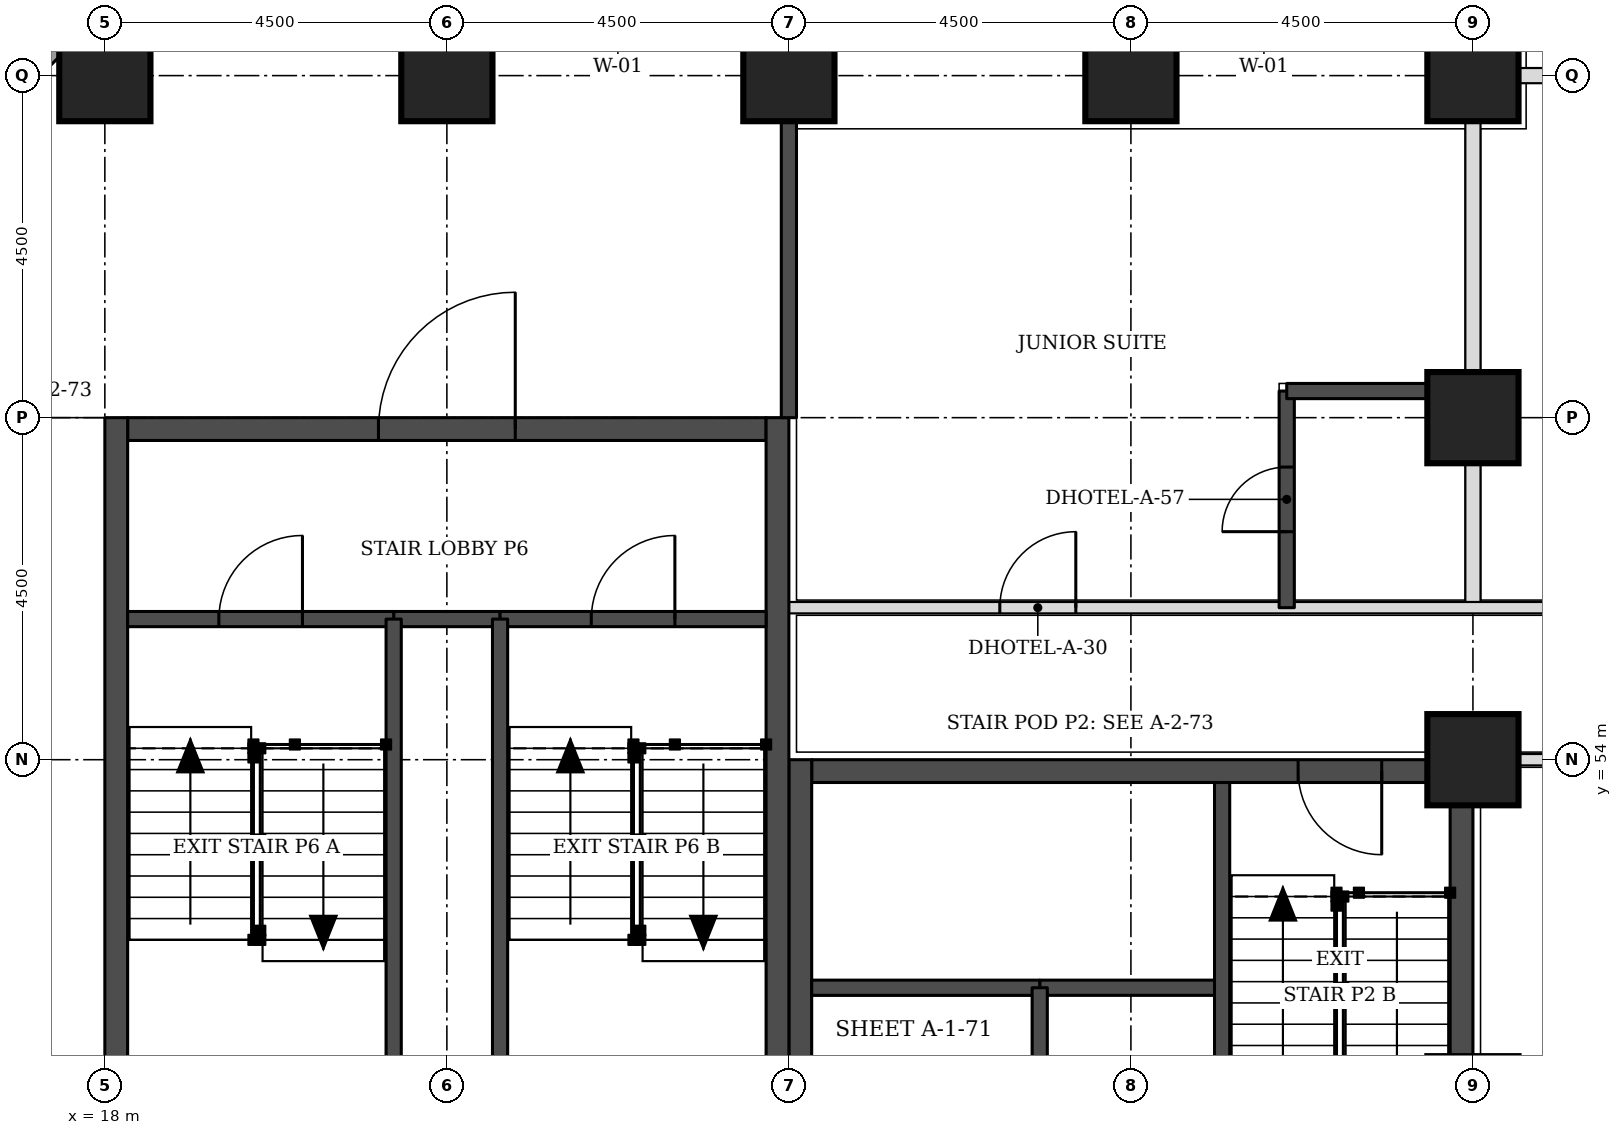
"""IFC4 building model, lengths in metres.
Left out: names, types, materials, properties, quantities, classifications, styles, units other than length and angle.
Written with IfcOpenShell. Run it as: python <this file> out.ifc"""

import sys

from ifc_helpers import new_model, si_unit, direction, frame, frame_2d, origin, origin_2d, place, context, subcontext, project, spatial, rectangle, extrude, element, fill, save


model = new_model("IFC4")
c1 = context("Model", 3, precision=1e-05, world=origin(), true_north=direction((0.0, 1.0)))
c2 = subcontext(c1, "Body", "Model", "MODEL_VIEW")
j1 = project(units=[si_unit("LENGTHUNIT", "METRE"), si_unit("PLANEANGLEUNIT", "RADIAN")], contexts=[c1])
p1 = place(None, origin())
s1 = spatial("IfcSite", under=j1, at=p1, CompositionType="ELEMENT")
p2 = place(p1, origin())
s2 = spatial("IfcBuilding", under=s1, at=p2, CompositionType="ELEMENT")
p3 = place(p2, frame((0.0, 0.0, 26.4)))
s3 = spatial("IfcBuildingStorey", under=s2, at=p3, CompositionType="ELEMENT", Elevation=26.4)
for number, where, z_axis, x_axis in (
    (1, (36.0, 54.0, 0.0), (0.0, 0.0, 1.0), (1.0, 0.0, 0.0)),
    (2, (36.0, 58.5, 0.0), (0.0, 0.0, 1.0), (1.0, 0.0, 0.0)),
    (3, (18.0, 63.0, 0.0), (0.0, 0.0, 1.0), (1.0, 0.0, 0.0)),
    (4, (22.5, 63.0, 0.0), (0.0, 0.0, 1.0), (1.0, 0.0, 0.0)),
    (5, (27.0, 63.0, 0.0), (0.0, 0.0, 1.0), (1.0, 0.0, 0.0)),
    (6, (31.5, 63.0, 0.0), (0.0, 0.0, 1.0), (1.0, 0.0, 0.0)),
    (7, (36.0, 63.0, 0.0), (0.0, 0.0, 1.0), (1.0, 0.0, 0.0)),
):
    element("IfcColumn", number, at=place(p3, frame(where, z_axis=z_axis, x_axis=x_axis)), inside=s3, PredefinedType="COLUMN", context=c2, shape_type="SweptSolid", body=[
        extrude(rectangle(XDim=1.2, YDim=1.2, at=origin_2d()), origin(), (0.0, 0.0, 1.0), 3.3),
    ])
p4 = place(p3, frame((27.3, 53.85, 0.0), z_axis=(0.0, 0.0, 1.0), x_axis=(1.0, 0.0, 0.0)))
e8 = element("IfcWall", 8, at=p4, inside=s3, PredefinedType="SHEAR", context=c2, shape_type="SweptSolid", body=[
    extrude(rectangle(XDim=8.4, YDim=0.3, at=frame_2d((4.2, 0.0))), origin(), (0.0, 0.0, 1.0), 3.3),
])
p5 = place(p4, frame((6.4, 0.0, 0.0)))
e9 = element("IfcOpeningElement", 9, at=p5, cuts=e8, PredefinedType="OPENING", context=c2, shape_type="SweptSolid", body=[
    extrude(rectangle(XDim=1.1, YDim=2.1, at=frame_2d((0.55, 1.05))), frame((0.0, 0.16, 0.0), z_axis=(0.0, -1.0, 0.0), x_axis=(1.0, 0.0, 0.0)), (0.0, 0.0, 1.0), 0.32),
])
p6 = place(p3, frame((27.15, 45.0, 0.0), z_axis=(0.0, 0.0, 1.0), x_axis=(0.0, 1.0, 0.0)))
e10 = element("IfcWall", 10, at=p6, inside=s3, PredefinedType="SHEAR", context=c2, shape_type="SweptSolid", body=[
    extrude(rectangle(XDim=9.0, YDim=0.3, at=frame_2d((4.5, 0.0))), origin(), (0.0, 0.0, 1.0), 3.3),
])
p7 = place(p6, frame((0.4, 0.0, 0.0)))
e11 = element("IfcOpeningElement", 11, at=p7, cuts=e10, PredefinedType="OPENING", context=c2, shape_type="SweptSolid", body=[
    extrude(rectangle(XDim=1.1, YDim=2.1, at=frame_2d((0.55, 1.05))), frame((0.0, 0.16, 0.0), z_axis=(0.0, -1.0, 0.0), x_axis=(1.0, 0.0, 0.0)), (0.0, 0.0, 1.0), 0.32),
])
p8 = place(p3, frame((35.85, 45.0, 0.0), z_axis=(0.0, 0.0, 1.0), x_axis=(0.0, 1.0, 0.0)))
e12 = element("IfcWall", 12, at=p8, inside=s3, PredefinedType="SHEAR", context=c2, shape_type="SweptSolid", body=[
    extrude(rectangle(XDim=9.0, YDim=0.3, at=frame_2d((4.5, 0.0))), origin(), (0.0, 0.0, 1.0), 3.3),
])
p9 = place(p3, frame((18.3, 58.35, 0.0), z_axis=(0.0, 0.0, 1.0), x_axis=(1.0, 0.0, 0.0)))
e13 = element("IfcWall", 13, at=p9, inside=s3, PredefinedType="SHEAR", context=c2, shape_type="SweptSolid", body=[
    extrude(rectangle(XDim=8.4, YDim=0.3, at=frame_2d((4.2, 0.0))), origin(), (0.0, 0.0, 1.0), 3.3),
])
p10 = place(p9, frame((3.3, 0.0, 0.0)))
e14 = element("IfcOpeningElement", 14, at=p10, cuts=e13, PredefinedType="OPENING", context=c2, shape_type="SweptSolid", body=[
    extrude(rectangle(XDim=1.8, YDim=2.1, at=frame_2d((0.9, 1.05))), frame((0.0, 0.16, 0.0), z_axis=(0.0, -1.0, 0.0), x_axis=(1.0, 0.0, 0.0)), (0.0, 0.0, 1.0), 0.32),
])
for number, where, z_axis, x_axis in (
    (15, (18.15, 49.5, 0.0), (0.0, 0.0, 1.0), (0.0, 1.0, 0.0)),
    (16, (26.85, 49.5, 0.0), (0.0, 0.0, 1.0), (0.0, 1.0, 0.0)),
):
    element("IfcWall", number, at=place(p3, frame(where, z_axis=z_axis, x_axis=x_axis)), inside=s3, PredefinedType="SHEAR", context=c2, shape_type="SweptSolid", body=[
        extrude(rectangle(XDim=9.0, YDim=0.3, at=frame_2d((4.5, 0.0))), origin(), (0.0, 0.0, 1.0), 3.3),
    ])
p11 = place(p3, frame((17.73, 63.826, 0.0), z_axis=(0.0, 0.0, 1.0), x_axis=(-0.707106781187, -0.707106781187, 0.0)))
e17 = element("IfcWall", 17, at=p11, inside=s3, PredefinedType="STANDARD", context=c2, shape_type="SweptSolid", body=[
    extrude(rectangle(XDim=7.151, YDim=0.35, at=frame_2d((3.576, 0.0))), origin(), (0.0, 0.0, 1.0), 3.055),
])
p12 = place(p11, frame((1.926, 0.0, 0.8)))
e18 = element("IfcOpeningElement", 18, at=p12, cuts=e17, PredefinedType="OPENING", context=c2, shape_type="SweptSolid", body=[
    extrude(rectangle(XDim=3.3, YDim=1.5, at=frame_2d((1.65, 0.75))), frame((0.0, 0.185, 0.0), z_axis=(0.0, -1.0, 0.0), x_axis=(1.0, 0.0, 0.0)), (0.0, 0.0, 1.0), 0.37),
])
p13 = place(p3, frame((36.0, 56.0, 0.0), z_axis=(0.0, 0.0, 1.0), x_axis=(0.0, 1.0, 0.0)))
e19 = element("IfcWall", 19, at=p13, inside=s3, PredefinedType="PARTITIONING", context=c2, shape_type="SweptSolid", body=[
    extrude(rectangle(XDim=6.4, YDim=0.2, at=frame_2d((3.2, 0.0))), origin(), (0.0, 0.0, 1.0), 2.33),
])
p14 = place(p3, frame((36.6, 63.0, 0.0), z_axis=(0.0, 0.0, 1.0), x_axis=(1.0, 0.0, 0.0)))
e20 = element("IfcWall", 20, at=p14, inside=s3, PredefinedType="PARTITIONING", context=c2, shape_type="SweptSolid", body=[
    extrude(rectangle(XDim=6.4, YDim=0.2, at=frame_2d((3.2, 0.0))), origin(), (0.0, 0.0, 1.0), 3.08),
])
p15 = place(p3, frame((36.05, 54.0, 0.0), z_axis=(0.0, 0.0, 1.0), x_axis=(1.0, 0.0, 0.0)))
e21 = element("IfcWall", 21, at=p15, inside=s3, PredefinedType="PARTITIONING", context=c2, shape_type="SweptSolid", body=[
    extrude(rectangle(XDim=6.95, YDim=0.15, at=frame_2d((3.475, 0.0))), origin(), (0.0, 0.0, 1.0), 3.08),
])
p16 = place(p15, frame((3.0, 0.0, 0.0)))
e22 = element("IfcOpeningElement", 22, at=p16, cuts=e21, PredefinedType="OPENING", context=c2, shape_type="SweptSolid", body=[
    extrude(rectangle(XDim=0.9, YDim=2.1, at=frame_2d((0.45, 1.05))), frame((0.0, 0.085, 0.0), z_axis=(0.0, -1.0, 0.0), x_axis=(1.0, 0.0, 0.0)), (0.0, 0.0, 1.0), 0.17),
])
p17 = place(p3, frame((27.0, 56.0, 0.0), z_axis=(0.0, 0.0, 1.0), x_axis=(1.0, 0.0, 0.0)))
e23 = element("IfcWall", 23, at=p17, inside=s3, PredefinedType="PARTITIONING", context=c2, shape_type="SweptSolid", body=[
    extrude(rectangle(XDim=16.0, YDim=0.15, at=frame_2d((8.0, 0.0))), origin(), (0.0, 0.0, 1.0), 3.08),
])
p18 = place(p17, frame((2.775, 0.0, 0.0)))
e24 = element("IfcOpeningElement", 24, at=p18, cuts=e23, PredefinedType="OPENING", context=c2, shape_type="SweptSolid", body=[
    extrude(rectangle(XDim=1.0, YDim=2.1, at=frame_2d((0.5, 1.05))), frame((0.0, 0.085, 0.0), z_axis=(0.0, -1.0, 0.0), x_axis=(1.0, 0.0, 0.0)), (0.0, 0.0, 1.0), 0.17),
])
p19 = place(p3, frame((27.0, 58.5, 0.0), z_axis=(0.0, 0.0, 1.0), x_axis=(0.0, 1.0, 0.0)))
e25 = element("IfcWall", 25, at=p19, inside=s3, PredefinedType="SOLIDWALL", context=c2, shape_type="SweptSolid", body=[
    extrude(rectangle(XDim=3.9, YDim=0.2, at=frame_2d((1.95, 0.0))), origin(), (0.0, 0.0, 1.0), 3.08),
])
p20 = place(p3, frame((33.55, 56.0, 0.0), z_axis=(0.0, 0.0, 1.0), x_axis=(0.0, 1.0, 0.0)))
e26 = element("IfcWall", 26, at=p20, inside=s3, PredefinedType="SOLIDWALL", context=c2, shape_type="SweptSolid", body=[
    extrude(rectangle(XDim=2.85, YDim=0.2, at=frame_2d((1.425, 0.0))), origin(), (0.0, 0.0, 1.0), 3.08),
])
p21 = place(p20, frame((1.0, 0.0, 0.0)))
e27 = element("IfcOpeningElement", 27, at=p21, cuts=e26, PredefinedType="OPENING", context=c2, shape_type="SweptSolid", body=[
    extrude(rectangle(XDim=0.85, YDim=2.1, at=frame_2d((0.425, 1.05))), frame((0.0, 0.11, 0.0), z_axis=(0.0, -1.0, 0.0), x_axis=(1.0, 0.0, 0.0)), (0.0, 0.0, 1.0), 0.22),
])
p22 = place(p3, frame((33.55, 58.85, 0.0), z_axis=(0.0, 0.0, 1.0), x_axis=(1.0, 0.0, 0.0)))
e28 = element("IfcWall", 28, at=p22, inside=s3, PredefinedType="SOLIDWALL", context=c2, shape_type="SweptSolid", body=[
    extrude(rectangle(XDim=2.45, YDim=0.2, at=frame_2d((1.225, 0.0))), origin(), (0.0, 0.0, 1.0), 3.08),
])
p23 = place(p3, frame((30.3, 51.0, 0.0), z_axis=(0.0, 0.0, 1.0), x_axis=(1.0, 0.0, 0.0)))
e29 = element("IfcWall", 29, at=p23, inside=s3, PredefinedType="SOLIDWALL", context=c2, shape_type="SweptSolid", body=[
    extrude(rectangle(XDim=2.4, YDim=0.2, at=frame_2d((1.2, 0.0))), origin(), (0.0, 0.0, 1.0), 3.3),
])
p24 = place(p3, frame((27.3, 51.0, 0.0), z_axis=(0.0, 0.0, 1.0), x_axis=(1.0, 0.0, 0.0)))
e30 = element("IfcWall", 30, at=p24, inside=s3, PredefinedType="SOLIDWALL", context=c2, shape_type="SweptSolid", body=[
    extrude(rectangle(XDim=3.0, YDim=0.2, at=frame_2d((1.5, 0.0))), origin(), (0.0, 0.0, 1.0), 3.08),
])
for number, where, z_axis, x_axis in (
    (31, (30.3, 45.3, 0.0), (0.0, 0.0, 1.0), (0.0, 1.0, 0.0)),
    (32, (32.7, 48.0, 0.0), (0.0, 0.0, 1.0), (0.0, 1.0, 0.0)),
):
    element("IfcWall", number, at=place(p3, frame(where, z_axis=z_axis, x_axis=x_axis)), inside=s3, PredefinedType="SOLIDWALL", context=c2, shape_type="SweptSolid", body=[
        extrude(rectangle(XDim=5.7, YDim=0.2, at=frame_2d((2.85, 0.0))), origin(), (0.0, 0.0, 1.0), 3.08),
    ])
p25 = place(p3, frame((21.8, 55.85, 0.0), z_axis=(0.0, 0.0, 1.0), x_axis=(1.0, 0.0, 0.0)))
e33 = element("IfcWall", 33, at=p25, inside=s3, PredefinedType="SOLIDWALL", context=c2, shape_type="SweptSolid", body=[
    extrude(rectangle(XDim=1.4, YDim=0.2, at=frame_2d((0.7, 0.0))), origin(), (0.0, 0.0, 1.0), 3.08),
])
p26 = place(p3, frame((18.3, 55.85, 0.0), z_axis=(0.0, 0.0, 1.0), x_axis=(1.0, 0.0, 0.0)))
e34 = element("IfcWall", 34, at=p26, inside=s3, PredefinedType="SOLIDWALL", context=c2, shape_type="SweptSolid", body=[
    extrude(rectangle(XDim=3.5, YDim=0.2, at=frame_2d((1.75, 0.0))), origin(), (0.0, 0.0, 1.0), 3.08),
])
p27 = place(p26, frame((1.2, 0.0, 0.0)))
e35 = element("IfcOpeningElement", 35, at=p27, cuts=e34, PredefinedType="OPENING", context=c2, shape_type="SweptSolid", body=[
    extrude(rectangle(XDim=1.1, YDim=2.1, at=frame_2d((0.55, 1.05))), frame((0.0, 0.11, 0.0), z_axis=(0.0, -1.0, 0.0), x_axis=(1.0, 0.0, 0.0)), (0.0, 0.0, 1.0), 0.22),
])
p28 = place(p3, frame((23.2, 55.85, 0.0), z_axis=(0.0, 0.0, 1.0), x_axis=(1.0, 0.0, 0.0)))
e36 = element("IfcWall", 36, at=p28, inside=s3, PredefinedType="SOLIDWALL", context=c2, shape_type="SweptSolid", body=[
    extrude(rectangle(XDim=3.5, YDim=0.2, at=frame_2d((1.75, 0.0))), origin(), (0.0, 0.0, 1.0), 3.08),
])
p29 = place(p28, frame((1.2, 0.0, 0.0)))
e37 = element("IfcOpeningElement", 37, at=p29, cuts=e36, PredefinedType="OPENING", context=c2, shape_type="SweptSolid", body=[
    extrude(rectangle(XDim=1.1, YDim=2.1, at=frame_2d((0.55, 1.05))), frame((0.0, 0.11, 0.0), z_axis=(0.0, -1.0, 0.0), x_axis=(1.0, 0.0, 0.0)), (0.0, 0.0, 1.0), 0.22),
])
for number, where, z_axis, x_axis in (
    (38, (21.8, 49.8, 0.0), (0.0, 0.0, 1.0), (0.0, 1.0, 0.0)),
    (39, (23.2, 49.8, 0.0), (0.0, 0.0, 1.0), (0.0, 1.0, 0.0)),
):
    element("IfcWall", number, at=place(p3, frame(where, z_axis=z_axis, x_axis=x_axis)), inside=s3, PredefinedType="SOLIDWALL", context=c2, shape_type="SweptSolid", body=[
        extrude(rectangle(XDim=6.05, YDim=0.2, at=frame_2d((3.025, 0.0))), origin(), (0.0, 0.0, 1.0), 3.08),
    ])
p30 = place(p18, origin())
e40 = element("IfcDoor", 40, at=p30, inside=s3, OperationType="SINGLE_SWING_RIGHT", PredefinedType="DOOR", context=c2, shape_type="SweptSolid", body=[
    extrude(rectangle(XDim=1.0, YDim=2.1, at=frame_2d((0.5, 1.05))), frame((0.0, 0.025, 0.0), z_axis=(0.0, -1.0, 0.0), x_axis=(1.0, 0.0, 0.0)), (0.0, 0.0, 1.0), 0.05),
])
fill(e24, e40)
p31 = place(p21, origin())
e41 = element("IfcDoor", 41, at=p31, inside=s3, OperationType="SINGLE_SWING_LEFT", PredefinedType="DOOR", context=c2, shape_type="SweptSolid", body=[
    extrude(rectangle(XDim=0.85, YDim=2.1, at=frame_2d((0.425, 1.05))), frame((0.0, 0.025, 0.0), z_axis=(0.0, -1.0, 0.0), x_axis=(1.0, 0.0, 0.0)), (0.0, 0.0, 1.0), 0.05),
])
fill(e27, e41)
p32 = place(p5, frame((1.1, 0.0, 0.0), z_axis=(0.0, 0.0, 1.0), x_axis=(-1.0, 0.0, 0.0)))
e42 = element("IfcDoor", 42, at=p32, inside=s3, OperationType="SINGLE_SWING_LEFT", PredefinedType="DOOR", context=c2, shape_type="SweptSolid", body=[
    extrude(rectangle(XDim=1.1, YDim=2.1, at=frame_2d((0.55, 1.05))), frame((0.0, 0.025, 0.0), z_axis=(0.0, -1.0, 0.0), x_axis=(1.0, 0.0, 0.0)), (0.0, 0.0, 1.0), 0.05),
])
fill(e9, e42)
p33 = place(p27, origin())
e43 = element("IfcDoor", 43, at=p33, inside=s3, OperationType="SINGLE_SWING_RIGHT", PredefinedType="DOOR", context=c2, shape_type="SweptSolid", body=[
    extrude(rectangle(XDim=1.1, YDim=2.1, at=frame_2d((0.55, 1.05))), frame((0.0, 0.025, 0.0), z_axis=(0.0, -1.0, 0.0), x_axis=(1.0, 0.0, 0.0)), (0.0, 0.0, 1.0), 0.05),
])
fill(e35, e43)
p34 = place(p29, origin())
e44 = element("IfcDoor", 44, at=p34, inside=s3, OperationType="SINGLE_SWING_RIGHT", PredefinedType="DOOR", context=c2, shape_type="SweptSolid", body=[
    extrude(rectangle(XDim=1.1, YDim=2.1, at=frame_2d((0.55, 1.05))), frame((0.0, 0.025, 0.0), z_axis=(0.0, -1.0, 0.0), x_axis=(1.0, 0.0, 0.0)), (0.0, 0.0, 1.0), 0.05),
])
fill(e37, e44)
p35 = place(p10, origin())
e45 = element("IfcDoor", 45, at=p35, inside=s3, OperationType="SINGLE_SWING_RIGHT", PredefinedType="DOOR", context=c2, shape_type="SweptSolid", body=[
    extrude(rectangle(XDim=1.8, YDim=2.1, at=frame_2d((0.9, 1.05))), frame((0.0, 0.025, 0.0), z_axis=(0.0, -1.0, 0.0), x_axis=(1.0, 0.0, 0.0)), (0.0, 0.0, 1.0), 0.05),
])
fill(e14, e45)
save(model, sys.argv[1])
